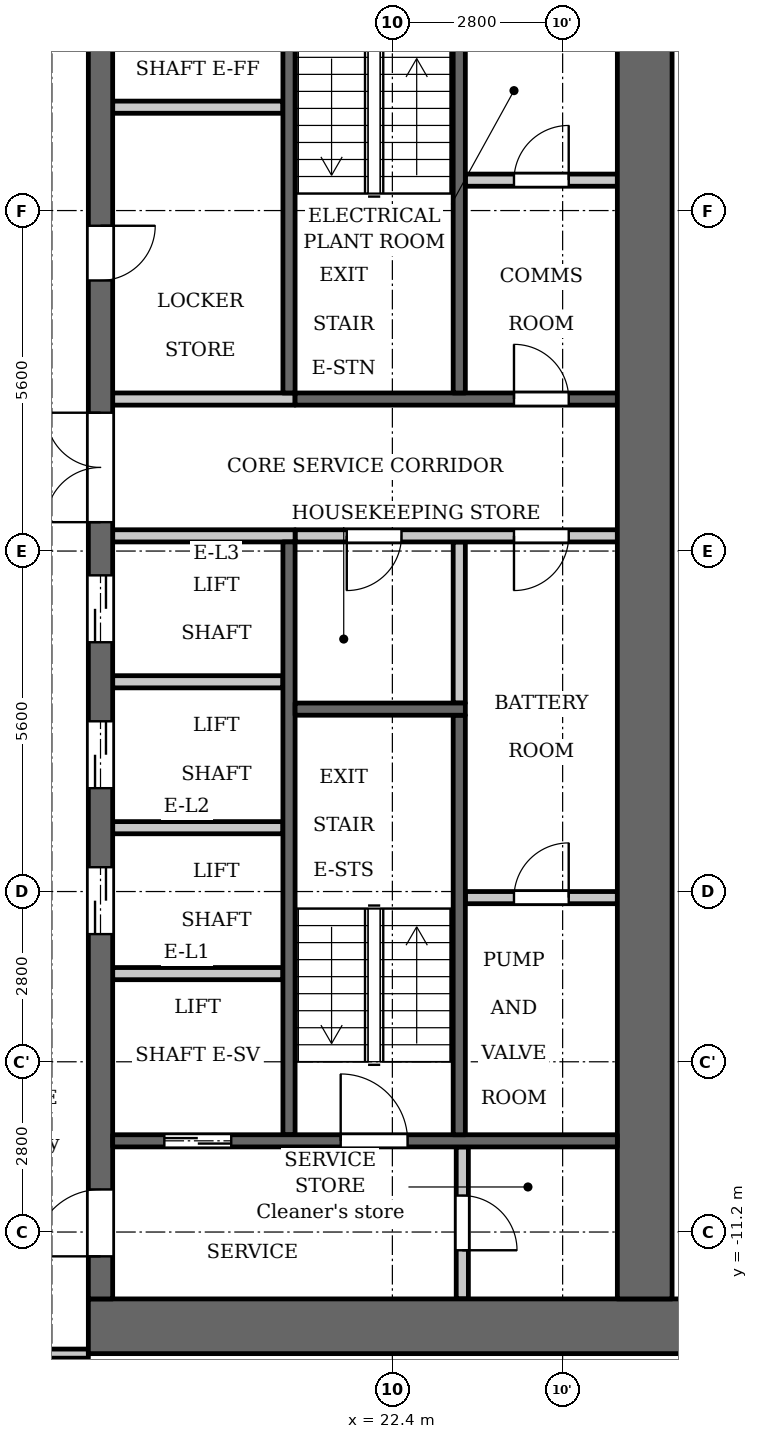
"""IFC4 building model, lengths in metres.
Left out: names, types, materials, properties, quantities, classifications, styles, units other than length and angle.
Written with IfcOpenShell. Run it as: python <this file> out.ifc"""

import sys

from ifc_helpers import new_model, si_unit, direction, frame, frame_2d, origin, place, context, subcontext, project, spatial, rectangle, extrude, element, fill, save


model = new_model("IFC4")
c1 = context("Model", 3, precision=1e-05, world=origin(), true_north=direction((0.0, 1.0)))
c2 = subcontext(c1, "Body", "Model", "MODEL_VIEW")
j1 = project(units=[si_unit("LENGTHUNIT", "METRE"), si_unit("PLANEANGLEUNIT", "RADIAN")], contexts=[c1])
p1 = place(None, origin())
s1 = spatial("IfcSite", under=j1, at=p1, CompositionType="ELEMENT")
p2 = place(p1, origin())
s2 = spatial("IfcBuilding", under=s1, at=p2, CompositionType="ELEMENT")
p3 = place(p2, frame((0.0, 0.0, 93.8)))
s3 = spatial("IfcBuildingStorey", under=s2, at=p3, CompositionType="ELEMENT", Elevation=93.8)
p4 = place(p3, frame((23.5, -2.5, 0.0), z_axis=(0.0, 0.0, 1.0), x_axis=(0.0, 1.0, 0.0)))
e1 = element("IfcWall", 1, at=p4, inside=s3, PredefinedType="PARTITIONING", context=c2, shape_type="SweptSolid", body=[
    extrude(rectangle(XDim=2.65, YDim=0.2, at=frame_2d((1.325, 0.0))), origin(), (0.0, 0.0, 1.0), 3.2),
])
p5 = place(p3, frame((20.7, 2.6, 0.0), z_axis=(0.0, 0.0, 1.0), x_axis=(0.0, 1.0, 0.0)))
e2 = element("IfcWall", 2, at=p5, inside=s3, PredefinedType="SHEAR", context=c2, shape_type="SweptSolid", body=[
    extrude(rectangle(XDim=7.0, YDim=0.2, at=frame_2d((3.5, 0.0))), origin(), (0.0, 0.0, 1.0), 3.2),
])
p6 = place(p3, frame((20.7, -9.6, 0.0), z_axis=(0.0, 0.0, 1.0), x_axis=(0.0, 1.0, 0.0)))
e3 = element("IfcWall", 3, at=p6, inside=s3, PredefinedType="SHEAR", context=c2, shape_type="SweptSolid", body=[
    extrude(rectangle(XDim=9.75, YDim=0.2, at=frame_2d((4.875, 0.0))), origin(), (0.0, 0.0, 1.0), 3.2),
])
p7 = place(p3, frame((20.8, 2.5, 0.0), z_axis=(0.0, 0.0, 1.0), x_axis=(1.0, 0.0, 0.0)))
e4 = element("IfcWall", 4, at=p7, inside=s3, PredefinedType="SHEAR", context=c2, shape_type="SweptSolid", body=[
    extrude(rectangle(XDim=5.3, YDim=0.2, at=frame_2d((2.65, 0.0))), origin(), (0.0, 0.0, 1.0), 3.2),
])
p8 = place(p7, frame((3.6, 0.0, 0.0)))
e5 = element("IfcOpeningElement", 5, at=p8, cuts=e4, PredefinedType="OPENING", context=c2, shape_type="SweptSolid", body=[
    extrude(rectangle(XDim=0.9, YDim=2.1, at=frame_2d((0.45, 1.05))), frame((0.0, 0.11, 0.0), z_axis=(0.0, -1.0, 0.0), x_axis=(1.0, 0.0, 0.0)), (0.0, 0.0, 1.0), 0.22),
])
p9 = place(p3, frame((20.8, 0.25, 0.0), z_axis=(0.0, 0.0, 1.0), x_axis=(1.0, 0.0, 0.0)))
e6 = element("IfcWall", 6, at=p9, inside=s3, PredefinedType="PARTITIONING", context=c2, shape_type="SweptSolid", body=[
    extrude(rectangle(XDim=5.3, YDim=0.2, at=frame_2d((2.65, 0.0))), origin(), (0.0, 0.0, 1.0), 3.2),
])
p10 = place(p9, frame((0.85, 0.0, 0.0)))
e7 = element("IfcOpeningElement", 7, at=p10, cuts=e6, PredefinedType="OPENING", context=c2, shape_type="SweptSolid", body=[
    extrude(rectangle(XDim=0.9, YDim=2.1, at=frame_2d((0.45, 1.05))), frame((0.0, 0.11, 0.0), z_axis=(0.0, -1.0, 0.0), x_axis=(1.0, 0.0, 0.0)), (0.0, 0.0, 1.0), 0.22),
])
p11 = place(p9, frame((3.6, 0.0, 0.0)))
e8 = element("IfcOpeningElement", 8, at=p11, cuts=e6, PredefinedType="OPENING", context=c2, shape_type="SweptSolid", body=[
    extrude(rectangle(XDim=0.9, YDim=2.1, at=frame_2d((0.45, 1.05))), frame((0.0, 0.11, 0.0), z_axis=(0.0, -1.0, 0.0), x_axis=(1.0, 0.0, 0.0)), (0.0, 0.0, 1.0), 0.22),
])
p12 = place(p3, frame((17.4, -12.75, 0.0), z_axis=(0.0, 0.0, 1.0), x_axis=(1.0, 0.0, 0.0)))
e9 = element("IfcWall", 9, at=p12, inside=s3, PredefinedType="SHEAR", context=c2, shape_type="SweptSolid", body=[
    extrude(rectangle(XDim=10.4, YDim=0.9, at=frame_2d((5.2, 0.0))), origin(), (0.0, 0.0, 1.0), 3.2),
])
p13 = place(p3, frame((17.6, -12.3, 0.0), z_axis=(0.0, 0.0, 1.0), x_axis=(0.0, 1.0, 0.0)))
e10 = element("IfcWall", 10, at=p13, inside=s3, PredefinedType="SHEAR", context=c2, shape_type="SweptSolid", body=[
    extrude(rectangle(XDim=24.6, YDim=0.4, at=frame_2d((12.3, 0.0))), origin(), (0.0, 0.0, 1.0), 3.2),
])
p14 = place(p13, frame((6.0, 0.0, 0.0)))
e11 = element("IfcOpeningElement", 11, at=p14, cuts=e10, PredefinedType="OPENING", context=c2, shape_type="SweptSolid", body=[
    extrude(rectangle(XDim=1.1, YDim=2.1, at=frame_2d((0.55, 1.05))), frame((0.0, 0.21, 0.0), z_axis=(0.0, -1.0, 0.0), x_axis=(1.0, 0.0, 0.0)), (0.0, 0.0, 1.0), 0.42),
])
p15 = place(p13, frame((8.4, 0.0, 0.0)))
e12 = element("IfcOpeningElement", 12, at=p15, cuts=e10, PredefinedType="OPENING", context=c2, shape_type="SweptSolid", body=[
    extrude(rectangle(XDim=1.1, YDim=2.1, at=frame_2d((0.55, 1.05))), frame((0.0, 0.21, 0.0), z_axis=(0.0, -1.0, 0.0), x_axis=(1.0, 0.0, 0.0)), (0.0, 0.0, 1.0), 0.42),
])
p16 = place(p13, frame((10.8, 0.0, 0.0)))
e13 = element("IfcOpeningElement", 13, at=p16, cuts=e10, PredefinedType="OPENING", context=c2, shape_type="SweptSolid", body=[
    extrude(rectangle(XDim=1.1, YDim=2.1, at=frame_2d((0.55, 1.05))), frame((0.0, 0.21, 0.0), z_axis=(0.0, -1.0, 0.0), x_axis=(1.0, 0.0, 0.0)), (0.0, 0.0, 1.0), 0.42),
])
p17 = place(p13, frame((16.75, 0.0, 0.0)))
e14 = element("IfcOpeningElement", 14, at=p17, cuts=e10, PredefinedType="OPENING", context=c2, shape_type="SweptSolid", body=[
    extrude(rectangle(XDim=0.9, YDim=2.1, at=frame_2d((0.45, 1.05))), frame((0.0, 0.21, 0.0), z_axis=(0.0, -1.0, 0.0), x_axis=(1.0, 0.0, 0.0)), (0.0, 0.0, 1.0), 0.42),
])
p18 = place(p13, frame((22.8, 0.0, 0.0)))
e15 = element("IfcOpeningElement", 15, at=p18, cuts=e10, PredefinedType="OPENING", context=c2, shape_type="SweptSolid", body=[
    extrude(rectangle(XDim=1.1, YDim=2.1, at=frame_2d((0.55, 1.05))), frame((0.0, 0.21, 0.0), z_axis=(0.0, -1.0, 0.0), x_axis=(1.0, 0.0, 0.0)), (0.0, 0.0, 1.0), 0.42),
])
p19 = place(p13, frame((0.7, 0.0, 0.0)))
e16 = element("IfcOpeningElement", 16, at=p19, cuts=e10, PredefinedType="OPENING", context=c2, shape_type="SweptSolid", body=[
    extrude(rectangle(XDim=1.1, YDim=2.1, at=frame_2d((0.55, 1.05))), frame((0.0, 0.21, 0.0), z_axis=(0.0, -1.0, 0.0), x_axis=(1.0, 0.0, 0.0)), (0.0, 0.0, 1.0), 0.42),
])
p20 = place(p13, frame((12.775, 0.0, 0.0)))
e17 = element("IfcOpeningElement", 17, at=p20, cuts=e10, PredefinedType="OPENING", context=c2, shape_type="SweptSolid", body=[
    extrude(rectangle(XDim=1.8, YDim=2.1, at=frame_2d((0.9, 1.05))), frame((0.0, 0.21, 0.0), z_axis=(0.0, -1.0, 0.0), x_axis=(1.0, 0.0, 0.0)), (0.0, 0.0, 1.0), 0.42),
])
p21 = place(p3, frame((26.55, -12.3, 0.0), z_axis=(0.0, 0.0, 1.0), x_axis=(0.0, 1.0, 0.0)))
e18 = element("IfcWall", 18, at=p21, inside=s3, PredefinedType="SHEAR", context=c2, shape_type="SweptSolid", body=[
    extrude(rectangle(XDim=24.6, YDim=0.9, at=frame_2d((12.3, 0.0))), origin(), (0.0, 0.0, 1.0), 3.2),
])
p22 = place(p3, frame((23.55, -12.3, 0.0), z_axis=(0.0, 0.0, 1.0), x_axis=(0.0, 1.0, 0.0)))
e19 = element("IfcWall", 19, at=p22, inside=s3, PredefinedType="PARTITIONING", context=c2, shape_type="SweptSolid", body=[
    extrude(rectangle(XDim=2.5, YDim=0.2, at=frame_2d((1.25, 0.0))), origin(), (0.0, 0.0, 1.0), 3.2),
])
p23 = place(p22, frame((0.8, 0.0, 0.0)))
e20 = element("IfcOpeningElement", 20, at=p23, cuts=e19, PredefinedType="OPENING", context=c2, shape_type="SweptSolid", body=[
    extrude(rectangle(XDim=0.9, YDim=2.1, at=frame_2d((0.45, 1.05))), frame((0.0, 0.11, 0.0), z_axis=(0.0, -1.0, 0.0), x_axis=(1.0, 0.0, 0.0)), (0.0, 0.0, 1.0), 0.22),
])
p24 = place(p3, frame((23.6, -5.7, 0.0), z_axis=(0.0, 0.0, 1.0), x_axis=(1.0, 0.0, 0.0)))
e21 = element("IfcWall", 21, at=p24, inside=s3, PredefinedType="PARTITIONING", context=c2, shape_type="SweptSolid", body=[
    extrude(rectangle(XDim=2.5, YDim=0.2, at=frame_2d((1.25, 0.0))), origin(), (0.0, 0.0, 1.0), 3.2),
])
p25 = place(p24, frame((0.8, 0.0, 0.0)))
e22 = element("IfcOpeningElement", 22, at=p25, cuts=e21, PredefinedType="OPENING", context=c2, shape_type="SweptSolid", body=[
    extrude(rectangle(XDim=0.9, YDim=2.1, at=frame_2d((0.45, 1.05))), frame((0.0, 0.11, 0.0), z_axis=(0.0, -1.0, 0.0), x_axis=(1.0, 0.0, 0.0)), (0.0, 0.0, 1.0), 0.22),
])
p26 = place(p3, frame((23.6, 6.1, 0.0), z_axis=(0.0, 0.0, 1.0), x_axis=(1.0, 0.0, 0.0)))
e23 = element("IfcWall", 23, at=p26, inside=s3, PredefinedType="PARTITIONING", context=c2, shape_type="SweptSolid", body=[
    extrude(rectangle(XDim=2.5, YDim=0.2, at=frame_2d((1.25, 0.0))), origin(), (0.0, 0.0, 1.0), 3.2),
])
p27 = place(p26, frame((0.8, 0.0, 0.0)))
e24 = element("IfcOpeningElement", 24, at=p27, cuts=e23, PredefinedType="OPENING", context=c2, shape_type="SweptSolid", body=[
    extrude(rectangle(XDim=0.9, YDim=2.1, at=frame_2d((0.45, 1.05))), frame((0.0, 0.11, 0.0), z_axis=(0.0, -1.0, 0.0), x_axis=(1.0, 0.0, 0.0)), (0.0, 0.0, 1.0), 0.22),
])
p28 = place(p3, frame((17.8, -9.7, 0.0), z_axis=(0.0, 0.0, 1.0), x_axis=(1.0, 0.0, 0.0)))
e25 = element("IfcWall", 25, at=p28, inside=s3, PredefinedType="SHEAR", context=c2, shape_type="SweptSolid", body=[
    extrude(rectangle(XDim=8.3, YDim=0.2, at=frame_2d((4.15, 0.0))), origin(), (0.0, 0.0, 1.0), 3.2),
])
p29 = place(p28, frame((0.85, 0.0, 0.0)))
e26 = element("IfcOpeningElement", 26, at=p29, cuts=e25, PredefinedType="OPENING", context=c2, shape_type="SweptSolid", body=[
    extrude(rectangle(XDim=1.1, YDim=2.1, at=frame_2d((0.55, 1.05))), frame((0.0, 0.11, 0.0), z_axis=(0.0, -1.0, 0.0), x_axis=(1.0, 0.0, 0.0)), (0.0, 0.0, 1.0), 0.22),
])
p30 = place(p28, frame((3.75, 0.0, 0.0)))
e27 = element("IfcOpeningElement", 27, at=p30, cuts=e25, PredefinedType="OPENING", context=c2, shape_type="SweptSolid", body=[
    extrude(rectangle(XDim=1.1, YDim=2.1, at=frame_2d((0.55, 1.05))), frame((0.0, 0.11, 0.0), z_axis=(0.0, -1.0, 0.0), x_axis=(1.0, 0.0, 0.0)), (0.0, 0.0, 1.0), 0.22),
])
for number, where, z_axis, x_axis in (
    (28, (17.8, -6.95, 0.0), (0.0, 0.0, 1.0), (1.0, 0.0, 0.0)),
    (29, (17.8, -4.55, 0.0), (0.0, 0.0, 1.0), (1.0, 0.0, 0.0)),
    (30, (17.8, -2.15, 0.0), (0.0, 0.0, 1.0), (1.0, 0.0, 0.0)),
):
    element("IfcWall", number, at=place(p3, frame(where, z_axis=z_axis, x_axis=x_axis)), inside=s3, PredefinedType="PARTITIONING", context=c2, shape_type="SweptSolid", body=[
        extrude(rectangle(XDim=2.8, YDim=0.2, at=frame_2d((1.4, 0.0))), origin(), (0.0, 0.0, 1.0), 3.2),
    ])
for number, where, z_axis, x_axis in (
    (31, (17.8, 0.25, 0.0), (0.0, 0.0, 1.0), (1.0, 0.0, 0.0)),
    (32, (17.8, 2.5, 0.0), (0.0, 0.0, 1.0), (1.0, 0.0, 0.0)),
):
    element("IfcWall", number, at=place(p3, frame(where, z_axis=z_axis, x_axis=x_axis)), inside=s3, PredefinedType="PARTITIONING", context=c2, shape_type="SweptSolid", body=[
        extrude(rectangle(XDim=3.0, YDim=0.2, at=frame_2d((1.5, 0.0))), origin(), (0.0, 0.0, 1.0), 3.2),
    ])
p31 = place(p3, frame((17.8, 7.3, 0.0), z_axis=(0.0, 0.0, 1.0), x_axis=(1.0, 0.0, 0.0)))
e33 = element("IfcWall", 33, at=p31, inside=s3, PredefinedType="PARTITIONING", context=c2, shape_type="SweptSolid", body=[
    extrude(rectangle(XDim=2.8, YDim=0.2, at=frame_2d((1.4, 0.0))), origin(), (0.0, 0.0, 1.0), 3.2),
])
p32 = place(p3, frame((23.5, 2.6, 0.0), z_axis=(0.0, 0.0, 1.0), x_axis=(0.0, 1.0, 0.0)))
e34 = element("IfcWall", 34, at=p32, inside=s3, PredefinedType="SHEAR", context=c2, shape_type="SweptSolid", body=[
    extrude(rectangle(XDim=7.0, YDim=0.2, at=frame_2d((3.5, 0.0))), origin(), (0.0, 0.0, 1.0), 3.2),
])
p33 = place(p3, frame((23.5, -9.6, 0.0), z_axis=(0.0, 0.0, 1.0), x_axis=(0.0, 1.0, 0.0)))
e35 = element("IfcWall", 35, at=p33, inside=s3, PredefinedType="SHEAR", context=c2, shape_type="SweptSolid", body=[
    extrude(rectangle(XDim=6.9, YDim=0.2, at=frame_2d((3.45, 0.0))), origin(), (0.0, 0.0, 1.0), 3.2),
])
p34 = place(p3, frame((20.8, -2.6, 0.0), z_axis=(0.0, 0.0, 1.0), x_axis=(1.0, 0.0, 0.0)))
e36 = element("IfcWall", 36, at=p34, inside=s3, PredefinedType="SHEAR", context=c2, shape_type="SweptSolid", body=[
    extrude(rectangle(XDim=2.8, YDim=0.2, at=frame_2d((1.4, 0.0))), origin(), (0.0, 0.0, 1.0), 3.2),
])
p35 = place(p3, frame((-17.4, -13.2, 0.0), z_axis=(0.0, 0.0, 1.0), x_axis=(1.0, 0.0, 0.0)))
e37 = element("IfcWall", 37, at=p35, inside=s3, PredefinedType="PARTITIONING", context=c2, shape_type="SweptSolid", body=[
    extrude(rectangle(XDim=34.8, YDim=0.15, at=frame_2d((17.4, 0.0))), origin(), (0.0, 0.0, 1.0), 3.2),
])
p36 = place(p35, frame((0.65, 0.0, 0.0)))
e38 = element("IfcOpeningElement", 38, at=p36, cuts=e37, PredefinedType="OPENING", context=c2, shape_type="SweptSolid", body=[
    extrude(rectangle(XDim=1.0, YDim=2.1, at=frame_2d((0.5, 1.05))), frame((0.0, 0.085, 0.0), z_axis=(0.0, -1.0, 0.0), x_axis=(1.0, 0.0, 0.0)), (0.0, 0.0, 1.0), 0.17),
])
p37 = place(p35, frame((33.05, 0.0, 0.0)))
e39 = element("IfcOpeningElement", 39, at=p37, cuts=e37, PredefinedType="OPENING", context=c2, shape_type="SweptSolid", body=[
    extrude(rectangle(XDim=1.0, YDim=2.1, at=frame_2d((0.5, 1.05))), frame((0.0, 0.085, 0.0), z_axis=(0.0, -1.0, 0.0), x_axis=(1.0, 0.0, 0.0)), (0.0, 0.0, 1.0), 0.17),
])
p38 = place(p35, frame((4.55, 0.0, 0.0)))
e40 = element("IfcOpeningElement", 40, at=p38, cuts=e37, PredefinedType="OPENING", context=c2, shape_type="SweptSolid", body=[
    extrude(rectangle(XDim=1.0, YDim=2.1, at=frame_2d((0.5, 1.05))), frame((0.0, 0.085, 0.0), z_axis=(0.0, -1.0, 0.0), x_axis=(1.0, 0.0, 0.0)), (0.0, 0.0, 1.0), 0.17),
])
p39 = place(p35, frame((21.35, 0.0, 0.0)))
e41 = element("IfcOpeningElement", 41, at=p39, cuts=e37, PredefinedType="OPENING", context=c2, shape_type="SweptSolid", body=[
    extrude(rectangle(XDim=1.0, YDim=2.1, at=frame_2d((0.5, 1.05))), frame((0.0, 0.085, 0.0), z_axis=(0.0, -1.0, 0.0), x_axis=(1.0, 0.0, 0.0)), (0.0, 0.0, 1.0), 0.17),
])
p40 = place(p35, frame((30.75, 0.0, 0.0)))
e42 = element("IfcOpeningElement", 42, at=p40, cuts=e37, PredefinedType="OPENING", context=c2, shape_type="SweptSolid", body=[
    extrude(rectangle(XDim=1.0, YDim=2.1, at=frame_2d((0.5, 1.05))), frame((0.0, 0.085, 0.0), z_axis=(0.0, -1.0, 0.0), x_axis=(1.0, 0.0, 0.0)), (0.0, 0.0, 1.0), 0.17),
])
p41 = place(p29, origin())
e43 = element("IfcDoor", 43, at=p41, inside=s3, OperationType="DOUBLE_DOOR_SLIDING", PredefinedType="DOOR", context=c2, shape_type="SweptSolid", body=[
    extrude(rectangle(XDim=1.1, YDim=2.1, at=frame_2d((0.55, 1.05))), frame((0.0, 0.025, 0.0), z_axis=(0.0, -1.0, 0.0), x_axis=(1.0, 0.0, 0.0)), (0.0, 0.0, 1.0), 0.05),
])
fill(e26, e43)
p42 = place(p14, origin())
e44 = element("IfcDoor", 44, at=p42, inside=s3, OperationType="DOUBLE_DOOR_SLIDING", PredefinedType="DOOR", context=c2, shape_type="SweptSolid", body=[
    extrude(rectangle(XDim=1.1, YDim=2.1, at=frame_2d((0.55, 1.05))), frame((0.0, 0.025, 0.0), z_axis=(0.0, -1.0, 0.0), x_axis=(1.0, 0.0, 0.0)), (0.0, 0.0, 1.0), 0.05),
])
fill(e11, e44)
p43 = place(p15, origin())
e45 = element("IfcDoor", 45, at=p43, inside=s3, OperationType="DOUBLE_DOOR_SLIDING", PredefinedType="DOOR", context=c2, shape_type="SweptSolid", body=[
    extrude(rectangle(XDim=1.1, YDim=2.1, at=frame_2d((0.55, 1.05))), frame((0.0, 0.025, 0.0), z_axis=(0.0, -1.0, 0.0), x_axis=(1.0, 0.0, 0.0)), (0.0, 0.0, 1.0), 0.05),
])
fill(e12, e45)
p44 = place(p16, origin())
e46 = element("IfcDoor", 46, at=p44, inside=s3, OperationType="DOUBLE_DOOR_SLIDING", PredefinedType="DOOR", context=c2, shape_type="SweptSolid", body=[
    extrude(rectangle(XDim=1.1, YDim=2.1, at=frame_2d((0.55, 1.05))), frame((0.0, 0.025, 0.0), z_axis=(0.0, -1.0, 0.0), x_axis=(1.0, 0.0, 0.0)), (0.0, 0.0, 1.0), 0.05),
])
fill(e13, e46)
p45 = place(p17, origin())
e47 = element("IfcDoor", 47, at=p45, inside=s3, OperationType="SINGLE_SWING_RIGHT", PredefinedType="DOOR", context=c2, shape_type="SweptSolid", body=[
    extrude(rectangle(XDim=0.9, YDim=2.1, at=frame_2d((0.45, 1.05))), frame((0.0, 0.025, 0.0), z_axis=(0.0, -1.0, 0.0), x_axis=(1.0, 0.0, 0.0)), (0.0, 0.0, 1.0), 0.05),
])
fill(e14, e47)
p46 = place(p19, origin())
e48 = element("IfcDoor", 48, at=p46, inside=s3, OperationType="SINGLE_SWING_RIGHT", PredefinedType="DOOR", context=c2, shape_type="SweptSolid", body=[
    extrude(rectangle(XDim=1.1, YDim=2.1, at=frame_2d((0.55, 1.05))), frame((0.0, 0.025, 0.0), z_axis=(0.0, -1.0, 0.0), x_axis=(1.0, 0.0, 0.0)), (0.0, 0.0, 1.0), 0.05),
])
fill(e16, e48)
p47 = place(p23, origin())
e49 = element("IfcDoor", 49, at=p47, inside=s3, OperationType="SINGLE_SWING_LEFT", PredefinedType="DOOR", context=c2, shape_type="SweptSolid", body=[
    extrude(rectangle(XDim=0.9, YDim=2.1, at=frame_2d((0.45, 1.05))), frame((0.0, 0.025, 0.0), z_axis=(0.0, -1.0, 0.0), x_axis=(1.0, 0.0, 0.0)), (0.0, 0.0, 1.0), 0.05),
])
fill(e20, e49)
p48 = place(p30, origin())
e50 = element("IfcDoor", 50, at=p48, inside=s3, OperationType="SINGLE_SWING_RIGHT", PredefinedType="DOOR", context=c2, shape_type="SweptSolid", body=[
    extrude(rectangle(XDim=1.1, YDim=2.1, at=frame_2d((0.55, 1.05))), frame((0.0, 0.025, 0.0), z_axis=(0.0, -1.0, 0.0), x_axis=(1.0, 0.0, 0.0)), (0.0, 0.0, 1.0), 0.05),
])
fill(e27, e50)
p49 = place(p20, origin())
e51 = element("IfcDoor", 51, at=p49, inside=s3, OperationType="DOUBLE_DOOR_SINGLE_SWING", PredefinedType="DOOR", context=c2, shape_type="SweptSolid", body=[
    extrude(rectangle(XDim=1.8, YDim=2.1, at=frame_2d((0.9, 1.05))), frame((0.0, 0.025, 0.0), z_axis=(0.0, -1.0, 0.0), x_axis=(1.0, 0.0, 0.0)), (0.0, 0.0, 1.0), 0.05),
])
fill(e17, e51)
p50 = place(p10, origin())
e52 = element("IfcDoor", 52, at=p50, inside=s3, OperationType="SINGLE_SWING_LEFT", PredefinedType="DOOR", context=c2, shape_type="SweptSolid", body=[
    extrude(rectangle(XDim=0.9, YDim=2.1, at=frame_2d((0.45, 1.05))), frame((0.0, 0.025, 0.0), z_axis=(0.0, -1.0, 0.0), x_axis=(1.0, 0.0, 0.0)), (0.0, 0.0, 1.0), 0.05),
])
fill(e7, e52)
p51 = place(p25, origin())
e53 = element("IfcDoor", 53, at=p51, inside=s3, OperationType="SINGLE_SWING_LEFT", PredefinedType="DOOR", context=c2, shape_type="SweptSolid", body=[
    extrude(rectangle(XDim=0.9, YDim=2.1, at=frame_2d((0.45, 1.05))), frame((0.0, 0.025, 0.0), z_axis=(0.0, -1.0, 0.0), x_axis=(1.0, 0.0, 0.0)), (0.0, 0.0, 1.0), 0.05),
])
fill(e22, e53)
p52 = place(p11, origin())
e54 = element("IfcDoor", 54, at=p52, inside=s3, OperationType="SINGLE_SWING_LEFT", PredefinedType="DOOR", context=c2, shape_type="SweptSolid", body=[
    extrude(rectangle(XDim=0.9, YDim=2.1, at=frame_2d((0.45, 1.05))), frame((0.0, 0.025, 0.0), z_axis=(0.0, -1.0, 0.0), x_axis=(1.0, 0.0, 0.0)), (0.0, 0.0, 1.0), 0.05),
])
fill(e8, e54)
p53 = place(p27, origin())
e55 = element("IfcDoor", 55, at=p53, inside=s3, OperationType="SINGLE_SWING_LEFT", PredefinedType="DOOR", context=c2, shape_type="SweptSolid", body=[
    extrude(rectangle(XDim=0.9, YDim=2.1, at=frame_2d((0.45, 1.05))), frame((0.0, 0.025, 0.0), z_axis=(0.0, -1.0, 0.0), x_axis=(1.0, 0.0, 0.0)), (0.0, 0.0, 1.0), 0.05),
])
fill(e24, e55)
p54 = place(p8, origin())
e56 = element("IfcDoor", 56, at=p54, inside=s3, OperationType="SINGLE_SWING_RIGHT", PredefinedType="DOOR", context=c2, shape_type="SweptSolid", body=[
    extrude(rectangle(XDim=0.9, YDim=2.1, at=frame_2d((0.45, 1.05))), frame((0.0, 0.025, 0.0), z_axis=(0.0, -1.0, 0.0), x_axis=(1.0, 0.0, 0.0)), (0.0, 0.0, 1.0), 0.05),
])
fill(e5, e56)
save(model, sys.argv[1])
